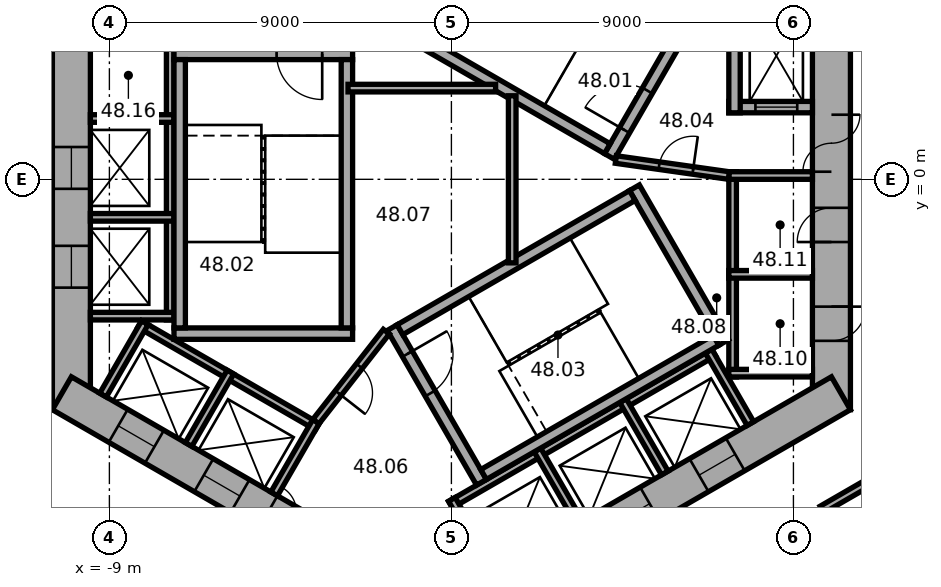
"""IFC4 building model, lengths in metres.
Left out: names, types, materials, properties, quantities, classifications, styles, units other than length and angle.
Written with IfcOpenShell. Run it as: python <this file> out.ifc"""

import sys

from ifc_helpers import new_model, si_unit, direction, frame, frame_2d, origin, place, context, subcontext, project, spatial, rectangle, extrude, element, fill, save


model = new_model("IFC4")
c1 = context("Model", 3, precision=1e-05, world=origin(), true_north=direction((0.0, 1.0)))
c2 = subcontext(c1, "Body", "Model", "MODEL_VIEW")
j1 = project(units=[si_unit("LENGTHUNIT", "METRE"), si_unit("PLANEANGLEUNIT", "RADIAN")], contexts=[c1])
p1 = place(None, origin())
s1 = spatial("IfcSite", under=j1, at=p1, CompositionType="ELEMENT")
p2 = place(p1, origin())
s2 = spatial("IfcBuilding", under=s1, at=p2, CompositionType="ELEMENT")
p3 = place(p2, frame((0.0, 0.0, 194.7)))
s3 = spatial("IfcBuildingStorey", under=s2, at=p3, CompositionType="ELEMENT", Elevation=194.7)
p4 = place(p3, frame((10.0, -6.062, 0.0), z_axis=(0.0, 0.0, 1.0), x_axis=(0.0, 1.0, 0.0)))
e1 = element("IfcWall", 1, at=p4, inside=s3, PredefinedType="SHEAR", context=c2, shape_type="SweptSolid", body=[
    extrude(rectangle(XDim=12.125, YDim=1.0, at=frame_2d((6.062, 0.0))), origin(), (0.0, 0.0, 1.0), 3.7),
])
p5 = place(p4, frame((6.262, 0.0, 0.0)))
e2 = element("IfcOpeningElement", 2, at=p5, cuts=e1, PredefinedType="OPENING", context=c2, shape_type="SweptSolid", body=[
    extrude(rectangle(XDim=1.5, YDim=2.1, at=frame_2d((0.75, 1.05))), frame((0.0, 0.51, 0.0), z_axis=(0.0, -1.0, 0.0), x_axis=(1.0, 0.0, 0.0)), (0.0, 0.0, 1.0), 1.02),
])
p6 = place(p4, frame((1.812, 0.0, 0.0)))
e3 = element("IfcOpeningElement", 3, at=p6, cuts=e1, PredefinedType="OPENING", context=c2, shape_type="SweptSolid", body=[
    extrude(rectangle(XDim=0.9, YDim=2.1, at=frame_2d((0.45, 1.05))), frame((0.0, 0.51, 0.0), z_axis=(0.0, -1.0, 0.0), x_axis=(1.0, 0.0, 0.0)), (0.0, 0.0, 1.0), 1.02),
])
p7 = place(p4, frame((4.412, 0.0, 0.0)))
e4 = element("IfcOpeningElement", 4, at=p7, cuts=e1, PredefinedType="OPENING", context=c2, shape_type="SweptSolid", body=[
    extrude(rectangle(XDim=0.9, YDim=2.1, at=frame_2d((0.45, 1.05))), frame((0.0, 0.51, 0.0), z_axis=(0.0, -1.0, 0.0), x_axis=(1.0, 0.0, 0.0)), (0.0, 0.0, 1.0), 1.02),
])
p8 = place(p3, frame((-10.0, 6.062, 0.0), z_axis=(0.0, 0.0, 1.0), x_axis=(0.0, -1.0, 0.0)))
e5 = element("IfcWall", 5, at=p8, inside=s3, PredefinedType="SHEAR", context=c2, shape_type="SweptSolid", body=[
    extrude(rectangle(XDim=12.125, YDim=1.0, at=frame_2d((6.062, 0.0))), origin(), (0.0, 0.0, 1.0), 3.7),
])
p9 = place(p8, frame((5.212, 0.0, 0.0)))
e6 = element("IfcOpeningElement", 6, at=p9, cuts=e5, PredefinedType="OPENING", context=c2, shape_type="SweptSolid", body=[
    extrude(rectangle(XDim=1.1, YDim=2.1, at=frame_2d((0.55, 1.05))), frame((0.0, 0.51, 0.0), z_axis=(0.0, -1.0, 0.0), x_axis=(1.0, 0.0, 0.0)), (0.0, 0.0, 1.0), 1.02),
])
p10 = place(p8, frame((7.812, 0.0, 0.0)))
e7 = element("IfcOpeningElement", 7, at=p10, cuts=e5, PredefinedType="OPENING", context=c2, shape_type="SweptSolid", body=[
    extrude(rectangle(XDim=1.1, YDim=2.1, at=frame_2d((0.55, 1.05))), frame((0.0, 0.51, 0.0), z_axis=(0.0, -1.0, 0.0), x_axis=(1.0, 0.0, 0.0)), (0.0, 0.0, 1.0), 1.02),
])
p11 = place(p3, frame((-10.25, -5.629, 0.0), z_axis=(0.0, 0.0, 1.0), x_axis=(0.866022616891, -0.50000482701, 0.0)))
e8 = element("IfcWall", 8, at=p11, inside=s3, PredefinedType="SHEAR", context=c2, shape_type="SweptSolid", body=[
    extrude(rectangle(XDim=12.125, YDim=1.0, at=frame_2d((6.062, 0.0))), origin(), (0.0, 0.0, 1.0), 3.7),
])
p12 = place(p11, frame((6.262, 0.0, 0.0)))
e9 = element("IfcOpeningElement", 9, at=p12, cuts=e8, PredefinedType="OPENING", context=c2, shape_type="SweptSolid", body=[
    extrude(rectangle(XDim=1.5, YDim=2.1, at=frame_2d((0.75, 1.05))), frame((0.0, 0.51, 0.0), z_axis=(0.0, -1.0, 0.0), x_axis=(1.0, 0.0, 0.0)), (0.0, 0.0, 1.0), 1.02),
])
p13 = place(p11, frame((1.712, 0.0, 0.0)))
e10 = element("IfcOpeningElement", 10, at=p13, cuts=e8, PredefinedType="OPENING", context=c2, shape_type="SweptSolid", body=[
    extrude(rectangle(XDim=1.1, YDim=2.1, at=frame_2d((0.55, 1.05))), frame((0.0, 0.51, 0.0), z_axis=(0.0, -1.0, 0.0), x_axis=(1.0, 0.0, 0.0)), (0.0, 0.0, 1.0), 1.02),
])
p14 = place(p11, frame((4.312, 0.0, 0.0)))
e11 = element("IfcOpeningElement", 11, at=p14, cuts=e8, PredefinedType="OPENING", context=c2, shape_type="SweptSolid", body=[
    extrude(rectangle(XDim=1.1, YDim=2.1, at=frame_2d((0.55, 1.05))), frame((0.0, 0.51, 0.0), z_axis=(0.0, -1.0, 0.0), x_axis=(1.0, 0.0, 0.0)), (0.0, 0.0, 1.0), 1.02),
])
p15 = place(p3, frame((-0.25, -11.691, 0.0), z_axis=(0.0, 0.0, 1.0), x_axis=(0.866022616891, 0.50000482701, 0.0)))
e12 = element("IfcWall", 12, at=p15, inside=s3, PredefinedType="SHEAR", context=c2, shape_type="SweptSolid", body=[
    extrude(rectangle(XDim=12.125, YDim=1.0, at=frame_2d((6.062, 0.0))), origin(), (0.0, 0.0, 1.0), 3.7),
])
p16 = place(p15, frame((2.612, 0.0, 0.0)))
e13 = element("IfcOpeningElement", 13, at=p16, cuts=e12, PredefinedType="OPENING", context=c2, shape_type="SweptSolid", body=[
    extrude(rectangle(XDim=1.1, YDim=2.1, at=frame_2d((0.55, 1.05))), frame((0.0, 0.51, 0.0), z_axis=(0.0, -1.0, 0.0), x_axis=(1.0, 0.0, 0.0)), (0.0, 0.0, 1.0), 1.02),
])
p17 = place(p15, frame((5.212, 0.0, 0.0)))
e14 = element("IfcOpeningElement", 14, at=p17, cuts=e12, PredefinedType="OPENING", context=c2, shape_type="SweptSolid", body=[
    extrude(rectangle(XDim=1.1, YDim=2.1, at=frame_2d((0.55, 1.05))), frame((0.0, 0.51, 0.0), z_axis=(0.0, -1.0, 0.0), x_axis=(1.0, 0.0, 0.0)), (0.0, 0.0, 1.0), 1.02),
])
p18 = place(p15, frame((7.812, 0.0, 0.0)))
e15 = element("IfcOpeningElement", 15, at=p18, cuts=e12, PredefinedType="OPENING", context=c2, shape_type="SweptSolid", body=[
    extrude(rectangle(XDim=1.1, YDim=2.1, at=frame_2d((0.55, 1.05))), frame((0.0, 0.51, 0.0), z_axis=(0.0, -1.0, 0.0), x_axis=(1.0, 0.0, 0.0)), (0.0, 0.0, 1.0), 1.02),
])
p19 = place(p3, frame((7.4, -5.2, 0.0), z_axis=(0.0, 0.0, 1.0), x_axis=(0.0, 1.0, 0.0)))
e16 = element("IfcWall", 16, at=p19, inside=s3, PredefinedType="PARTITIONING", context=c2, shape_type="SweptSolid", body=[
    extrude(rectangle(XDim=5.4, YDim=0.2, at=frame_2d((2.7, 0.0))), origin(), (0.0, 0.0, 1.0), 3.42),
])
for number, where, z_axis, x_axis in (
    (17, (7.3, -5.1, 0.0), (0.0, 0.0, 1.0), (1.0, 0.0, 0.0)),
    (18, (7.3, -2.5, 0.0), (0.0, 0.0, 1.0), (1.0, 0.0, 0.0)),
    (19, (7.3, 0.1, 0.0), (0.0, 0.0, 1.0), (1.0, 0.0, 0.0)),
):
    element("IfcWall", number, at=place(p3, frame(where, z_axis=z_axis, x_axis=x_axis)), inside=s3, PredefinedType="PARTITIONING", context=c2, shape_type="SweptSolid", body=[
        extrude(rectangle(XDim=2.2, YDim=0.2, at=frame_2d((1.1, 0.0))), origin(), (0.0, 0.0, 1.0), 3.42),
    ])
p20 = place(p3, frame((-7.4, 4.3, 0.0), z_axis=(0.0, 0.0, 1.0), x_axis=(0.0, -1.0, 0.0)))
e20 = element("IfcWall", 20, at=p20, inside=s3, PredefinedType="PARTITIONING", context=c2, shape_type="SweptSolid", body=[
    extrude(rectangle(XDim=8.0, YDim=0.2, at=frame_2d((4.0, 0.0))), origin(), (0.0, 0.0, 1.0), 3.42),
])
for number, where, z_axis, x_axis in (
    (21, (-7.3, 1.6, 0.0), (0.0, 0.0, 1.0), (-1.0, 0.0, 0.0)),
    (22, (-7.3, -1.0, 0.0), (0.0, 0.0, 1.0), (-1.0, 0.0, 0.0)),
    (23, (-7.3, -3.6, 0.0), (0.0, 0.0, 1.0), (-1.0, 0.0, 0.0)),
):
    element("IfcWall", number, at=place(p3, frame(where, z_axis=z_axis, x_axis=x_axis)), inside=s3, PredefinedType="PARTITIONING", context=c2, shape_type="SweptSolid", body=[
        extrude(rectangle(XDim=2.2, YDim=0.2, at=frame_2d((1.1, 0.0))), origin(), (0.0, 0.0, 1.0), 3.42),
    ])
p21 = place(p3, frame((-8.203, -3.809, 0.0), z_axis=(0.0, 0.0, 1.0), x_axis=(0.866028230842, -0.499995103361, 0.0)))
e24 = element("IfcWall", 24, at=p21, inside=s3, PredefinedType="PARTITIONING", context=c2, shape_type="SweptSolid", body=[
    extrude(rectangle(XDim=5.4, YDim=0.2, at=frame_2d((2.7, 0.0))), origin(), (0.0, 0.0, 1.0), 3.42),
])
for number, where, z_axis, x_axis in (
    (25, (-8.067, -3.772, 0.0), (0.0, 0.0, 1.0), (-0.5, -0.866, 0.0)),
    (26, (-5.815, -5.072, 0.0), (0.0, 0.0, 1.0), (-0.5, -0.866, 0.0)),
):
    element("IfcWall", number, at=place(p3, frame(where, z_axis=z_axis, x_axis=x_axis)), inside=s3, PredefinedType="PARTITIONING", context=c2, shape_type="SweptSolid", body=[
        extrude(rectangle(XDim=2.2, YDim=0.2, at=frame_2d((1.1, 0.0))), origin(), (0.0, 0.0, 1.0), 3.42),
    ])
p22 = place(p3, frame((-3.563, -6.372, 0.0), z_axis=(0.0, 0.0, 1.0), x_axis=(-0.499994660107, -0.866028486751, 0.0)))
e27 = element("IfcWall", 27, at=p22, inside=s3, PredefinedType="PARTITIONING", context=c2, shape_type="SweptSolid", body=[
    extrude(rectangle(XDim=2.2, YDim=0.2, at=frame_2d((1.1, 0.0))), origin(), (0.0, 0.0, 1.0), 3.42),
])
p23 = place(p3, frame((-0.024, -8.559, 0.0), z_axis=(0.0, 0.0, 1.0), x_axis=(0.866026010844, 0.49999894854, 0.0)))
e28 = element("IfcWall", 28, at=p23, inside=s3, PredefinedType="PARTITIONING", context=c2, shape_type="SweptSolid", body=[
    extrude(rectangle(XDim=8.0, YDim=0.2, at=frame_2d((4.0, 0.0))), origin(), (0.0, 0.0, 1.0), 3.42),
])
for number, where, z_axis, x_axis in (
    (29, (0.013, -8.422, 0.0), (0.0, 0.0, 1.0), (0.5, -0.866, 0.0)),
    (30, (2.264, -7.122, 0.0), (0.0, 0.0, 1.0), (0.5, -0.866, 0.0)),
    (31, (4.516, -5.822, 0.0), (0.0, 0.0, 1.0), (0.5, -0.866, 0.0)),
    (32, (6.768, -4.522, 0.0), (0.0, 0.0, 1.0), (0.5, -0.866, 0.0)),
):
    element("IfcWall", number, at=place(p3, frame(where, z_axis=z_axis, x_axis=x_axis)), inside=s3, PredefinedType="PARTITIONING", context=c2, shape_type="SweptSolid", body=[
        extrude(rectangle(XDim=2.2, YDim=0.2, at=frame_2d((1.1, 0.0))), origin(), (0.0, 0.0, 1.0), 3.42),
    ])
p24 = place(p3, frame((4.158, 0.602, 0.0), z_axis=(0.0, 0.0, 1.0), x_axis=(0.499977259774, 0.866038532462, 0.0)))
e33 = element("IfcWall", 33, at=p24, inside=s3, PredefinedType="SHEAR", context=c2, shape_type="SweptSolid", body=[
    extrude(rectangle(XDim=4.7, YDim=0.3, at=frame_2d((2.35, 0.0))), origin(), (0.0, 0.0, 1.0), 3.42),
])
p25 = place(p24, frame((0.8, 0.0, 0.0)))
e34 = element("IfcOpeningElement", 34, at=p25, cuts=e33, PredefinedType="OPENING", context=c2, shape_type="SweptSolid", body=[
    extrude(rectangle(XDim=1.2, YDim=2.1, at=frame_2d((0.6, 1.05))), frame((0.0, 0.16, 0.0), z_axis=(0.0, -1.0, 0.0), x_axis=(1.0, 0.0, 0.0)), (0.0, 0.0, 1.0), 0.32),
])
p26 = place(p3, frame((4.103, 0.807, 0.0), z_axis=(0.0, 0.0, 1.0), x_axis=(-0.866027801685, 0.499995846692, 0.0)))
e35 = element("IfcWall", 35, at=p26, inside=s3, PredefinedType="SHEAR", context=c2, shape_type="SweptSolid", body=[
    extrude(rectangle(XDim=7.06, YDim=0.3, at=frame_2d((3.53, 0.0))), origin(), (0.0, 0.0, 1.0), 3.42),
])
p27 = place(p3, frame((-2.6, 3.3, 0.0), z_axis=(0.0, 0.0, 1.0), x_axis=(-1.0, 0.0, 0.0)))
e36 = element("IfcWall", 36, at=p27, inside=s3, PredefinedType="SHEAR", context=c2, shape_type="SweptSolid", body=[
    extrude(rectangle(XDim=4.7, YDim=0.3, at=frame_2d((2.35, 0.0))), origin(), (0.0, 0.0, 1.0), 3.42),
])
p28 = place(p27, frame((0.8, 0.0, 0.0)))
e37 = element("IfcOpeningElement", 37, at=p28, cuts=e36, PredefinedType="OPENING", context=c2, shape_type="SweptSolid", body=[
    extrude(rectangle(XDim=1.2, YDim=2.1, at=frame_2d((0.6, 1.05))), frame((0.0, 0.16, 0.0), z_axis=(0.0, -1.0, 0.0), x_axis=(1.0, 0.0, 0.0)), (0.0, 0.0, 1.0), 0.32),
])
p29 = place(p3, frame((-2.6, -4.06, 0.0), z_axis=(0.0, 0.0, 1.0), x_axis=(-1.0, 0.0, 0.0)))
e38 = element("IfcWall", 38, at=p29, inside=s3, PredefinedType="SHEAR", context=c2, shape_type="SweptSolid", body=[
    extrude(rectangle(XDim=4.7, YDim=0.3, at=frame_2d((2.35, 0.0))), origin(), (0.0, 0.0, 1.0), 3.42),
])
for number, where, z_axis, x_axis in (
    (39, (-2.75, 3.15, 0.0), (0.0, 0.0, 1.0), (0.0, -1.0, 0.0)),
    (40, (-7.15, 3.15, 0.0), (0.0, 0.0, 1.0), (0.0, -1.0, 0.0)),
):
    element("IfcWall", number, at=place(p3, frame(where, z_axis=z_axis, x_axis=x_axis)), inside=s3, PredefinedType="SHEAR", context=c2, shape_type="SweptSolid", body=[
        extrude(rectangle(XDim=7.06, YDim=0.3, at=frame_2d((3.53, 0.0))), origin(), (0.0, 0.0, 1.0), 3.42),
    ])
p30 = place(p3, frame((-1.558, -3.902, 0.0), z_axis=(0.0, 0.0, 1.0), x_axis=(0.499977259774, -0.866038532462, 0.0)))
e41 = element("IfcWall", 41, at=p30, inside=s3, PredefinedType="SHEAR", context=c2, shape_type="SweptSolid", body=[
    extrude(rectangle(XDim=4.7, YDim=0.3, at=frame_2d((2.35, 0.0))), origin(), (0.0, 0.0, 1.0), 3.42),
])
p31 = place(p30, frame((0.8, 0.0, 0.0)))
e42 = element("IfcOpeningElement", 42, at=p31, cuts=e41, PredefinedType="OPENING", context=c2, shape_type="SweptSolid", body=[
    extrude(rectangle(XDim=1.2, YDim=2.1, at=frame_2d((0.6, 1.05))), frame((0.0, 0.16, 0.0), z_axis=(0.0, -1.0, 0.0), x_axis=(1.0, 0.0, 0.0)), (0.0, 0.0, 1.0), 0.32),
])
p32 = place(p3, frame((4.816, -0.222, 0.0), z_axis=(0.0, 0.0, 1.0), x_axis=(0.499977259774, -0.866038532462, 0.0)))
e43 = element("IfcWall", 43, at=p32, inside=s3, PredefinedType="SHEAR", context=c2, shape_type="SweptSolid", body=[
    extrude(rectangle(XDim=4.7, YDim=0.3, at=frame_2d((2.35, 0.0))), origin(), (0.0, 0.0, 1.0), 3.42),
])
for number, where, z_axis, x_axis in (
    (44, (-1.353, -3.957, 0.0), (0.0, 0.0, 1.0), (0.866, 0.5, 0.0)),
    (45, (0.847, -7.767, 0.0), (0.0, 0.0, 1.0), (0.866, 0.5, 0.0)),
):
    element("IfcWall", number, at=place(p3, frame(where, z_axis=z_axis, x_axis=x_axis)), inside=s3, PredefinedType="SHEAR", context=c2, shape_type="SweptSolid", body=[
        extrude(rectangle(XDim=7.06, YDim=0.3, at=frame_2d((3.53, 0.0))), origin(), (0.0, 0.0, 1.0), 3.42),
    ])
p33 = place(p3, frame((7.3, 1.9, 0.0), z_axis=(0.0, 0.0, 1.0), x_axis=(1.0, 0.0, 0.0)))
e46 = element("IfcWall", 46, at=p33, inside=s3, PredefinedType="SHEAR", context=c2, shape_type="SweptSolid", body=[
    extrude(rectangle(XDim=2.2, YDim=0.3, at=frame_2d((1.1, 0.0))), origin(), (0.0, 0.0, 1.0), 3.42),
])
p34 = place(p33, frame((0.7, 0.0, 0.0)))
e47 = element("IfcOpeningElement", 47, at=p34, cuts=e46, PredefinedType="OPENING", context=c2, shape_type="SweptSolid", body=[
    extrude(rectangle(XDim=1.1, YDim=2.1, at=frame_2d((0.55, 1.05))), frame((0.0, 0.16, 0.0), z_axis=(0.0, -1.0, 0.0), x_axis=(1.0, 0.0, 0.0)), (0.0, 0.0, 1.0), 0.32),
])
p35 = place(p3, frame((7.45, 1.75, 0.0), z_axis=(0.0, 0.0, 1.0), x_axis=(0.0, 1.0, 0.0)))
e48 = element("IfcWall", 48, at=p35, inside=s3, PredefinedType="SHEAR", context=c2, shape_type="SweptSolid", body=[
    extrude(rectangle(XDim=3.35, YDim=0.3, at=frame_2d((1.675, 0.0))), origin(), (0.0, 0.0, 1.0), 3.42),
])
p36 = place(p3, frame((4.327, 0.521, 0.0), z_axis=(0.0, 0.0, 1.0), x_axis=(0.990124376366, -0.14019172346, 0.0)))
e49 = element("IfcWall", 49, at=p36, inside=s3, PredefinedType="PARTITIONING", context=c2, shape_type="SweptSolid", body=[
    extrude(rectangle(XDim=3.002, YDim=0.2, at=frame_2d((1.501, 0.0))), origin(), (0.0, 0.0, 1.0), 3.42),
])
p37 = place(p36, frame((1.15, 0.0, 0.0)))
e50 = element("IfcOpeningElement", 50, at=p37, cuts=e49, PredefinedType="OPENING", context=c2, shape_type="SweptSolid", body=[
    extrude(rectangle(XDim=0.9, YDim=2.1, at=frame_2d((0.45, 1.05))), frame((0.0, 0.11, 0.0), z_axis=(0.0, -1.0, 0.0), x_axis=(1.0, 0.0, 0.0)), (0.0, 0.0, 1.0), 0.22),
])
p38 = place(p3, frame((-1.712, -4.008, 0.0), z_axis=(0.0, 0.0, 1.0), x_axis=(-0.616549420702, -0.787316208287, 0.0)))
e51 = element("IfcWall", 51, at=p38, inside=s3, PredefinedType="PARTITIONING", context=c2, shape_type="SweptSolid", body=[
    extrude(rectangle(XDim=3.002, YDim=0.2, at=frame_2d((1.501, 0.0))), origin(), (0.0, 0.0, 1.0), 3.42),
])
p39 = place(p38, frame((1.15, 0.0, 0.0)))
e52 = element("IfcOpeningElement", 52, at=p39, cuts=e51, PredefinedType="OPENING", context=c2, shape_type="SweptSolid", body=[
    extrude(rectangle(XDim=0.9, YDim=2.1, at=frame_2d((0.45, 1.05))), frame((0.0, 0.11, 0.0), z_axis=(0.0, -1.0, 0.0), x_axis=(1.0, 0.0, 0.0)), (0.0, 0.0, 1.0), 0.22),
])
p40 = place(p3, frame((-2.72, 2.4, 0.0), z_axis=(0.0, 0.0, 1.0), x_axis=(1.0, 0.0, 0.0)))
e53 = element("IfcWall", 53, at=p40, inside=s3, PredefinedType="PARTITIONING", context=c2, shape_type="SweptSolid", body=[
    extrude(rectangle(XDim=3.883, YDim=0.2, at=frame_2d((1.941, 0.0))), origin(), (0.0, 0.0, 1.0), 3.42),
])
p41 = place(p3, frame((1.6, -2.198, 0.0), z_axis=(0.0, 0.0, 1.0), x_axis=(0.0, 1.0, 0.0)))
e54 = element("IfcWall", 54, at=p41, inside=s3, PredefinedType="PARTITIONING", context=c2, shape_type="SweptSolid", body=[
    extrude(rectangle(XDim=4.397, YDim=0.2, at=frame_2d((2.198, 0.0))), origin(), (0.0, 0.0, 1.0), 3.42),
])
p42 = place(p3, frame((9.752, -8.688, 0.0), z_axis=(0.0, 0.0, 1.0), x_axis=(0.865974105138, 0.500088841337, 0.0)))
e55 = element("IfcWall", 55, at=p42, inside=s3, PredefinedType="PARTITIONING", context=c2, shape_type="SweptSolid", body=[
    extrude(rectangle(XDim=1.961, YDim=0.2, at=frame_2d((0.98, 0.0))), origin(), (0.0, 0.0, 1.0), 3.42),
])
p43 = place(p5, origin())
e56 = element("IfcDoor", 56, at=p43, inside=s3, OperationType="DOUBLE_DOOR_SINGLE_SWING", PredefinedType="DOOR", context=c2, shape_type="SweptSolid", body=[
    extrude(rectangle(XDim=1.5, YDim=2.1, at=frame_2d((0.75, 1.05))), frame((0.0, 0.025, 0.0), z_axis=(0.0, -1.0, 0.0), x_axis=(1.0, 0.0, 0.0)), (0.0, 0.0, 1.0), 0.05),
])
fill(e2, e56)
p44 = place(p25, origin())
e57 = element("IfcDoor", 57, at=p44, inside=s3, OperationType="SINGLE_SWING_RIGHT", PredefinedType="DOOR", context=c2, shape_type="SweptSolid", body=[
    extrude(rectangle(XDim=1.2, YDim=2.1, at=frame_2d((0.6, 1.05))), frame((0.0, 0.025, 0.0), z_axis=(0.0, -1.0, 0.0), x_axis=(1.0, 0.0, 0.0)), (0.0, 0.0, 1.0), 0.05),
])
fill(e34, e57)
p45 = place(p28, origin())
e58 = element("IfcDoor", 58, at=p45, inside=s3, OperationType="SINGLE_SWING_RIGHT", PredefinedType="DOOR", context=c2, shape_type="SweptSolid", body=[
    extrude(rectangle(XDim=1.2, YDim=2.1, at=frame_2d((0.6, 1.05))), frame((0.0, 0.025, 0.0), z_axis=(0.0, -1.0, 0.0), x_axis=(1.0, 0.0, 0.0)), (0.0, 0.0, 1.0), 0.05),
])
fill(e37, e58)
p46 = place(p31, origin())
e59 = element("IfcDoor", 59, at=p46, inside=s3, OperationType="SINGLE_SWING_RIGHT", PredefinedType="DOOR", context=c2, shape_type="SweptSolid", body=[
    extrude(rectangle(XDim=1.2, YDim=2.1, at=frame_2d((0.6, 1.05))), frame((0.0, 0.025, 0.0), z_axis=(0.0, -1.0, 0.0), x_axis=(1.0, 0.0, 0.0)), (0.0, 0.0, 1.0), 0.05),
])
fill(e42, e59)
p47 = place(p37, origin())
e60 = element("IfcDoor", 60, at=p47, inside=s3, OperationType="SINGLE_SWING_LEFT", PredefinedType="DOOR", context=c2, shape_type="SweptSolid", body=[
    extrude(rectangle(XDim=0.9, YDim=2.1, at=frame_2d((0.45, 1.05))), frame((0.0, 0.025, 0.0), z_axis=(0.0, -1.0, 0.0), x_axis=(1.0, 0.0, 0.0)), (0.0, 0.0, 1.0), 0.05),
])
fill(e50, e60)
p48 = place(p39, origin())
e61 = element("IfcDoor", 61, at=p48, inside=s3, OperationType="SINGLE_SWING_LEFT", PredefinedType="DOOR", context=c2, shape_type="SweptSolid", body=[
    extrude(rectangle(XDim=0.9, YDim=2.1, at=frame_2d((0.45, 1.05))), frame((0.0, 0.025, 0.0), z_axis=(0.0, -1.0, 0.0), x_axis=(1.0, 0.0, 0.0)), (0.0, 0.0, 1.0), 0.05),
])
fill(e52, e61)
p49 = place(p6, origin())
e62 = element("IfcDoor", 62, at=p49, inside=s3, OperationType="SINGLE_SWING_LEFT", PredefinedType="DOOR", context=c2, shape_type="SweptSolid", body=[
    extrude(rectangle(XDim=0.9, YDim=2.1, at=frame_2d((0.45, 1.05))), frame((0.0, 0.025, 0.0), z_axis=(0.0, -1.0, 0.0), x_axis=(1.0, 0.0, 0.0)), (0.0, 0.0, 1.0), 0.05),
])
fill(e3, e62)
p50 = place(p7, origin())
e63 = element("IfcDoor", 63, at=p50, inside=s3, OperationType="SINGLE_SWING_LEFT", PredefinedType="DOOR", context=c2, shape_type="SweptSolid", body=[
    extrude(rectangle(XDim=0.9, YDim=2.1, at=frame_2d((0.45, 1.05))), frame((0.0, 0.025, 0.0), z_axis=(0.0, -1.0, 0.0), x_axis=(1.0, 0.0, 0.0)), (0.0, 0.0, 1.0), 0.05),
])
fill(e4, e63)
p51 = place(p34, origin())
e64 = element("IfcDoor", 64, at=p51, inside=s3, OperationType="DOUBLE_DOOR_SLIDING", PredefinedType="DOOR", context=c2, shape_type="SweptSolid", body=[
    extrude(rectangle(XDim=1.1, YDim=2.1, at=frame_2d((0.55, 1.05))), frame((0.0, 0.025, 0.0), z_axis=(0.0, -1.0, 0.0), x_axis=(1.0, 0.0, 0.0)), (0.0, 0.0, 1.0), 0.05),
])
fill(e47, e64)
p52 = place(p9, origin())
e65 = element("IfcDoor", 65, at=p52, inside=s3, OperationType="DOUBLE_DOOR_SLIDING", PredefinedType="DOOR", context=c2, shape_type="SweptSolid", body=[
    extrude(rectangle(XDim=1.1, YDim=2.1, at=frame_2d((0.55, 1.05))), frame((0.0, 0.025, 0.0), z_axis=(0.0, -1.0, 0.0), x_axis=(1.0, 0.0, 0.0)), (0.0, 0.0, 1.0), 0.05),
])
fill(e6, e65)
p53 = place(p10, origin())
e66 = element("IfcDoor", 66, at=p53, inside=s3, OperationType="DOUBLE_DOOR_SLIDING", PredefinedType="DOOR", context=c2, shape_type="SweptSolid", body=[
    extrude(rectangle(XDim=1.1, YDim=2.1, at=frame_2d((0.55, 1.05))), frame((0.0, 0.025, 0.0), z_axis=(0.0, -1.0, 0.0), x_axis=(1.0, 0.0, 0.0)), (0.0, 0.0, 1.0), 0.05),
])
fill(e7, e66)
p54 = place(p13, origin())
e67 = element("IfcDoor", 67, at=p54, inside=s3, OperationType="DOUBLE_DOOR_SLIDING", PredefinedType="DOOR", context=c2, shape_type="SweptSolid", body=[
    extrude(rectangle(XDim=1.1, YDim=2.1, at=frame_2d((0.55, 1.05))), frame((0.0, 0.025, 0.0), z_axis=(0.0, -1.0, 0.0), x_axis=(1.0, 0.0, 0.0)), (0.0, 0.0, 1.0), 0.05),
])
fill(e10, e67)
p55 = place(p14, origin())
e68 = element("IfcDoor", 68, at=p55, inside=s3, OperationType="DOUBLE_DOOR_SLIDING", PredefinedType="DOOR", context=c2, shape_type="SweptSolid", body=[
    extrude(rectangle(XDim=1.1, YDim=2.1, at=frame_2d((0.55, 1.05))), frame((0.0, 0.025, 0.0), z_axis=(0.0, -1.0, 0.0), x_axis=(1.0, 0.0, 0.0)), (0.0, 0.0, 1.0), 0.05),
])
fill(e11, e68)
p56 = place(p17, origin())
e69 = element("IfcDoor", 69, at=p56, inside=s3, OperationType="DOUBLE_DOOR_SLIDING", PredefinedType="DOOR", context=c2, shape_type="SweptSolid", body=[
    extrude(rectangle(XDim=1.1, YDim=2.1, at=frame_2d((0.55, 1.05))), frame((0.0, 0.025, 0.0), z_axis=(0.0, -1.0, 0.0), x_axis=(1.0, 0.0, 0.0)), (0.0, 0.0, 1.0), 0.05),
])
fill(e14, e69)
p57 = place(p18, origin())
e70 = element("IfcDoor", 70, at=p57, inside=s3, OperationType="DOUBLE_DOOR_SLIDING", PredefinedType="DOOR", context=c2, shape_type="SweptSolid", body=[
    extrude(rectangle(XDim=1.1, YDim=2.1, at=frame_2d((0.55, 1.05))), frame((0.0, 0.025, 0.0), z_axis=(0.0, -1.0, 0.0), x_axis=(1.0, 0.0, 0.0)), (0.0, 0.0, 1.0), 0.05),
])
fill(e15, e70)
save(model, sys.argv[1])
